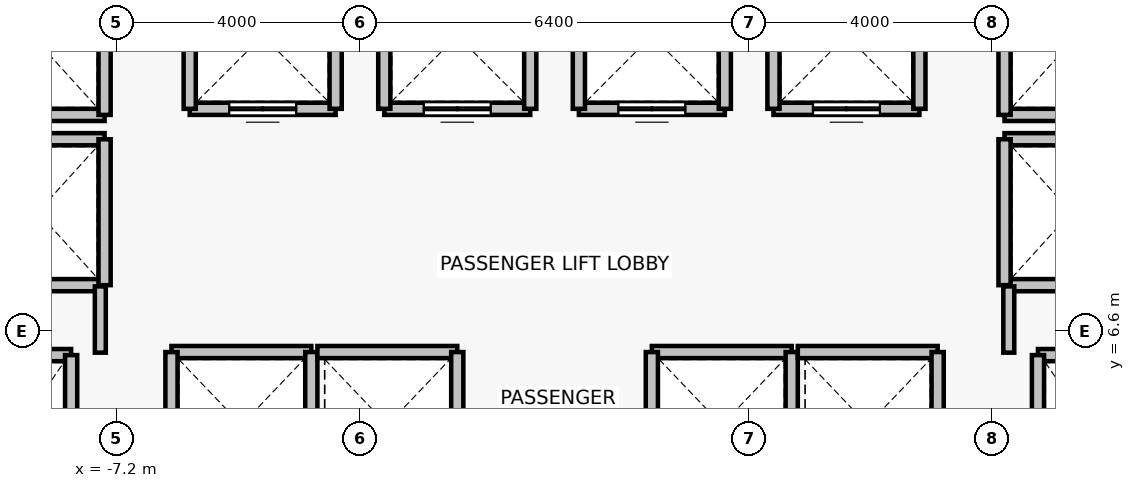
"""IFC4 building model, lengths in metres.
Left out: names, types, materials, properties, quantities, classifications, styles, units other than length and angle.
Written with IfcOpenShell. Run it as: python <this file> out.ifc"""

import sys

from ifc_helpers import new_model, si_unit, direction, frame, frame_2d, origin, place, context, subcontext, project, spatial, rectangle, extrude, source, transform, mapped, element, fill, save


model = new_model("IFC4")
c1 = context("Model", 3, precision=1e-05, world=origin(), true_north=direction((0.0, 1.0)))
c2 = subcontext(c1, "Body", "Model", "MODEL_VIEW")
j1 = project(units=[si_unit("LENGTHUNIT", "METRE"), si_unit("PLANEANGLEUNIT", "RADIAN")], contexts=[c1])
p1 = place(None, origin())
s1 = spatial("IfcSite", under=j1, at=p1, CompositionType="ELEMENT")
p2 = place(p1, origin())
s2 = spatial("IfcBuilding", under=s1, at=p2, CompositionType="ELEMENT")
p3 = place(p2, frame((0.0, 0.0, 43.9)))
s3 = spatial("IfcBuildingStorey", under=s2, at=p3, CompositionType="ELEMENT", Elevation=43.9)
p4 = place(p3, frame((-9.95, 6.2, 0.0), z_axis=(0.0, 0.0, 1.0), x_axis=(1.0, 0.0, 0.0)))
e1 = element("IfcWall", 1, at=p4, inside=s3, PredefinedType="SOLIDWALL", context=c2, shape_type="SweptSolid", body=[
    extrude(rectangle(XDim=2.0, YDim=0.2, at=frame_2d((1.0, 0.0))), origin(), (0.0, 0.0, 1.0), 3.075),
])
p5 = place(p3, frame((-7.95, 6.2, 0.0), z_axis=(0.0, 0.0, 1.0), x_axis=(0.0, -1.0, 0.0)))
e2 = element("IfcWall", 2, at=p5, inside=s3, PredefinedType="SOLIDWALL", context=c2, shape_type="SweptSolid", body=[
    extrude(rectangle(XDim=2.8, YDim=0.2, at=frame_2d((1.4, 0.0))), origin(), (0.0, 0.0, 1.0), 3.075),
])
p6 = place(p3, frame((7.95, 6.2, 0.0), z_axis=(0.0, 0.0, 1.0), x_axis=(1.0, 0.0, 0.0)))
e3 = element("IfcWall", 3, at=p6, inside=s3, PredefinedType="SOLIDWALL", context=c2, shape_type="SweptSolid", body=[
    extrude(rectangle(XDim=2.0, YDim=0.2, at=frame_2d((1.0, 0.0))), origin(), (0.0, 0.0, 1.0), 3.075),
])
p7 = place(p3, frame((7.95, 3.4, 0.0), z_axis=(0.0, 0.0, 1.0), x_axis=(0.0, 1.0, 0.0)))
e4 = element("IfcWall", 4, at=p7, inside=s3, PredefinedType="SOLIDWALL", context=c2, shape_type="SweptSolid", body=[
    extrude(rectangle(XDim=2.8, YDim=0.2, at=frame_2d((1.4, 0.0))), origin(), (0.0, 0.0, 1.0), 3.075),
])
p8 = place(p3, frame((-3.6, 10.25, 0.0), z_axis=(0.0, 0.0, 1.0), x_axis=(-1.0, 0.0, 0.0)))
e5 = element("IfcWall", 5, at=p8, inside=s3, PredefinedType="SOLIDWALL", context=c2, shape_type="SweptSolid", body=[
    extrude(rectangle(XDim=2.4, YDim=0.2, at=frame_2d((1.2, 0.0))), origin(), (0.0, 0.0, 1.0), 3.075),
])
p9 = place(p8, frame((0.65, 0.0, 0.0)))
e6 = element("IfcOpeningElement", 6, at=p9, cuts=e5, PredefinedType="OPENING", context=c2, shape_type="SweptSolid", body=[
    extrude(rectangle(XDim=1.1, YDim=2.2, at=frame_2d((0.55, 1.1))), frame((0.0, 0.11, 0.0), z_axis=(0.0, -1.0, 0.0), x_axis=(1.0, 0.0, 0.0)), (0.0, 0.0, 1.0), 0.22),
])
for number, where, z_axis, x_axis in (
    (7, (-6.0, 10.25, 0.0), (0.0, 0.0, 1.0), (0.0, 1.0, 0.0)),
    (8, (-3.6, 12.65, 0.0), (0.0, 0.0, 1.0), (0.0, -1.0, 0.0)),
):
    element("IfcWall", number, at=place(p3, frame(where, z_axis=z_axis, x_axis=x_axis)), inside=s3, PredefinedType="SOLIDWALL", context=c2, shape_type="SweptSolid", body=[
        extrude(rectangle(XDim=2.4, YDim=0.2, at=frame_2d((1.2, 0.0))), origin(), (0.0, 0.0, 1.0), 3.075),
    ])
p10 = place(p3, frame((-0.4, 10.25, 0.0), z_axis=(0.0, 0.0, 1.0), x_axis=(-1.0, 0.0, 0.0)))
e9 = element("IfcWall", 9, at=p10, inside=s3, PredefinedType="SOLIDWALL", context=c2, shape_type="SweptSolid", body=[
    extrude(rectangle(XDim=2.4, YDim=0.2, at=frame_2d((1.2, 0.0))), origin(), (0.0, 0.0, 1.0), 3.075),
])
p11 = place(p10, frame((0.65, 0.0, 0.0)))
e10 = element("IfcOpeningElement", 10, at=p11, cuts=e9, PredefinedType="OPENING", context=c2, shape_type="SweptSolid", body=[
    extrude(rectangle(XDim=1.1, YDim=2.2, at=frame_2d((0.55, 1.1))), frame((0.0, 0.11, 0.0), z_axis=(0.0, -1.0, 0.0), x_axis=(1.0, 0.0, 0.0)), (0.0, 0.0, 1.0), 0.22),
])
for number, where, z_axis, x_axis in (
    (11, (-2.8, 10.25, 0.0), (0.0, 0.0, 1.0), (0.0, 1.0, 0.0)),
    (12, (-0.4, 12.65, 0.0), (0.0, 0.0, 1.0), (0.0, -1.0, 0.0)),
):
    element("IfcWall", number, at=place(p3, frame(where, z_axis=z_axis, x_axis=x_axis)), inside=s3, PredefinedType="SOLIDWALL", context=c2, shape_type="SweptSolid", body=[
        extrude(rectangle(XDim=2.4, YDim=0.2, at=frame_2d((1.2, 0.0))), origin(), (0.0, 0.0, 1.0), 3.075),
    ])
p12 = place(p3, frame((2.8, 10.25, 0.0), z_axis=(0.0, 0.0, 1.0), x_axis=(-1.0, 0.0, 0.0)))
e13 = element("IfcWall", 13, at=p12, inside=s3, PredefinedType="SOLIDWALL", context=c2, shape_type="SweptSolid", body=[
    extrude(rectangle(XDim=2.4, YDim=0.2, at=frame_2d((1.2, 0.0))), origin(), (0.0, 0.0, 1.0), 3.075),
])
p13 = place(p12, frame((0.65, 0.0, 0.0)))
e14 = element("IfcOpeningElement", 14, at=p13, cuts=e13, PredefinedType="OPENING", context=c2, shape_type="SweptSolid", body=[
    extrude(rectangle(XDim=1.1, YDim=2.2, at=frame_2d((0.55, 1.1))), frame((0.0, 0.11, 0.0), z_axis=(0.0, -1.0, 0.0), x_axis=(1.0, 0.0, 0.0)), (0.0, 0.0, 1.0), 0.22),
])
for number, where, z_axis, x_axis in (
    (15, (0.4, 10.25, 0.0), (0.0, 0.0, 1.0), (0.0, 1.0, 0.0)),
    (16, (2.8, 12.65, 0.0), (0.0, 0.0, 1.0), (0.0, -1.0, 0.0)),
):
    element("IfcWall", number, at=place(p3, frame(where, z_axis=z_axis, x_axis=x_axis)), inside=s3, PredefinedType="SOLIDWALL", context=c2, shape_type="SweptSolid", body=[
        extrude(rectangle(XDim=2.4, YDim=0.2, at=frame_2d((1.2, 0.0))), origin(), (0.0, 0.0, 1.0), 3.075),
    ])
p14 = place(p3, frame((6.0, 10.25, 0.0), z_axis=(0.0, 0.0, 1.0), x_axis=(-1.0, 0.0, 0.0)))
e17 = element("IfcWall", 17, at=p14, inside=s3, PredefinedType="SOLIDWALL", context=c2, shape_type="SweptSolid", body=[
    extrude(rectangle(XDim=2.4, YDim=0.2, at=frame_2d((1.2, 0.0))), origin(), (0.0, 0.0, 1.0), 3.075),
])
p15 = place(p14, frame((0.65, 0.0, 0.0)))
e18 = element("IfcOpeningElement", 18, at=p15, cuts=e17, PredefinedType="OPENING", context=c2, shape_type="SweptSolid", body=[
    extrude(rectangle(XDim=1.1, YDim=2.2, at=frame_2d((0.55, 1.1))), frame((0.0, 0.11, 0.0), z_axis=(0.0, -1.0, 0.0), x_axis=(1.0, 0.0, 0.0)), (0.0, 0.0, 1.0), 0.22),
])
for number, where, z_axis, x_axis in (
    (19, (3.6, 10.25, 0.0), (0.0, 0.0, 1.0), (0.0, 1.0, 0.0)),
    (20, (6.0, 12.65, 0.0), (0.0, 0.0, 1.0), (0.0, -1.0, 0.0)),
):
    element("IfcWall", number, at=place(p3, frame(where, z_axis=z_axis, x_axis=x_axis)), inside=s3, PredefinedType="SOLIDWALL", context=c2, shape_type="SweptSolid", body=[
        extrude(rectangle(XDim=2.4, YDim=0.2, at=frame_2d((1.2, 0.0))), origin(), (0.0, 0.0, 1.0), 3.075),
    ])
p16 = place(p3, frame((-6.3, 6.25, 0.0), z_axis=(0.0, 0.0, 1.0), x_axis=(1.0, 0.0, 0.0)))
e21 = element("IfcWall", 21, at=p16, inside=s3, PredefinedType="SOLIDWALL", context=c2, shape_type="SweptSolid", body=[
    extrude(rectangle(XDim=2.3, YDim=0.2, at=frame_2d((1.15, 0.0))), origin(), (0.0, 0.0, 1.0), 3.075),
])
for number, where, z_axis, x_axis in (
    (22, (-6.3, 3.85, 0.0), (0.0, 0.0, 1.0), (0.0, 1.0, 0.0)),
    (23, (-4.0, 6.25, 0.0), (0.0, 0.0, 1.0), (0.0, -1.0, 0.0)),
):
    element("IfcWall", number, at=place(p3, frame(where, z_axis=z_axis, x_axis=x_axis)), inside=s3, PredefinedType="SOLIDWALL", context=c2, shape_type="SweptSolid", body=[
        extrude(rectangle(XDim=2.4, YDim=0.2, at=frame_2d((1.2, 0.0))), origin(), (0.0, 0.0, 1.0), 3.075),
    ])
p17 = place(p3, frame((-3.9, 6.25, 0.0), z_axis=(0.0, 0.0, 1.0), x_axis=(1.0, 0.0, 0.0)))
e24 = element("IfcWall", 24, at=p17, inside=s3, PredefinedType="SOLIDWALL", context=c2, shape_type="SweptSolid", body=[
    extrude(rectangle(XDim=2.3, YDim=0.2, at=frame_2d((1.15, 0.0))), origin(), (0.0, 0.0, 1.0), 3.075),
])
p18 = place(p3, frame((-1.6, 6.25, 0.0), z_axis=(0.0, 0.0, 1.0), x_axis=(0.0, -1.0, 0.0)))
e25 = element("IfcWall", 25, at=p18, inside=s3, PredefinedType="SOLIDWALL", context=c2, shape_type="SweptSolid", body=[
    extrude(rectangle(XDim=2.4, YDim=0.2, at=frame_2d((1.2, 0.0))), origin(), (0.0, 0.0, 1.0), 3.075),
])
p19 = place(p3, frame((1.6, 6.25, 0.0), z_axis=(0.0, 0.0, 1.0), x_axis=(1.0, 0.0, 0.0)))
e26 = element("IfcWall", 26, at=p19, inside=s3, PredefinedType="SOLIDWALL", context=c2, shape_type="SweptSolid", body=[
    extrude(rectangle(XDim=2.3, YDim=0.2, at=frame_2d((1.15, 0.0))), origin(), (0.0, 0.0, 1.0), 3.075),
])
for number, where, z_axis, x_axis in (
    (27, (1.6, 3.85, 0.0), (0.0, 0.0, 1.0), (0.0, 1.0, 0.0)),
    (28, (3.9, 6.25, 0.0), (0.0, 0.0, 1.0), (0.0, -1.0, 0.0)),
):
    element("IfcWall", number, at=place(p3, frame(where, z_axis=z_axis, x_axis=x_axis)), inside=s3, PredefinedType="SOLIDWALL", context=c2, shape_type="SweptSolid", body=[
        extrude(rectangle(XDim=2.4, YDim=0.2, at=frame_2d((1.2, 0.0))), origin(), (0.0, 0.0, 1.0), 3.075),
    ])
p20 = place(p3, frame((4.0, 6.25, 0.0), z_axis=(0.0, 0.0, 1.0), x_axis=(1.0, 0.0, 0.0)))
e29 = element("IfcWall", 29, at=p20, inside=s3, PredefinedType="SOLIDWALL", context=c2, shape_type="SweptSolid", body=[
    extrude(rectangle(XDim=2.3, YDim=0.2, at=frame_2d((1.15, 0.0))), origin(), (0.0, 0.0, 1.0), 3.075),
])
p21 = place(p3, frame((6.3, 6.25, 0.0), z_axis=(0.0, 0.0, 1.0), x_axis=(0.0, -1.0, 0.0)))
e30 = element("IfcWall", 30, at=p21, inside=s3, PredefinedType="SOLIDWALL", context=c2, shape_type="SweptSolid", body=[
    extrude(rectangle(XDim=2.4, YDim=0.2, at=frame_2d((1.2, 0.0))), origin(), (0.0, 0.0, 1.0), 3.075),
])
for number, where, z_axis, x_axis in (
    (31, (-7.4, 7.35, 0.0), (0.0, 0.0, 1.0), (-1.0, 0.0, 0.0)),
    (32, (-9.6, 9.75, 0.0), (0.0, 0.0, 1.0), (1.0, 0.0, 0.0)),
):
    element("IfcWall", number, at=place(p3, frame(where, z_axis=z_axis, x_axis=x_axis)), inside=s3, PredefinedType="SOLIDWALL", context=c2, shape_type="SweptSolid", body=[
        extrude(rectangle(XDim=2.2, YDim=0.2, at=frame_2d((1.1, 0.0))), origin(), (0.0, 0.0, 1.0), 2.465),
    ])
p22 = place(p3, frame((-7.4, 9.75, 0.0), z_axis=(0.0, 0.0, 1.0), x_axis=(0.0, -1.0, 0.0)))
e33 = element("IfcWall", 33, at=p22, inside=s3, PredefinedType="SOLIDWALL", context=c2, shape_type="SweptSolid", body=[
    extrude(rectangle(XDim=2.4, YDim=0.2, at=frame_2d((1.2, 0.0))), origin(), (0.0, 0.0, 1.0), 2.465),
])
p23 = place(p3, frame((-7.4, 10.15, 0.0), z_axis=(0.0, 0.0, 1.0), x_axis=(-1.0, 0.0, 0.0)))
e34 = element("IfcWall", 34, at=p23, inside=s3, PredefinedType="SOLIDWALL", context=c2, shape_type="SweptSolid", body=[
    extrude(rectangle(XDim=2.2, YDim=0.2, at=frame_2d((1.1, 0.0))), origin(), (0.0, 0.0, 1.0), 2.465),
])
p24 = place(p3, frame((-7.4, 12.55, 0.0), z_axis=(0.0, 0.0, 1.0), x_axis=(0.0, -1.0, 0.0)))
e35 = element("IfcWall", 35, at=p24, inside=s3, PredefinedType="SOLIDWALL", context=c2, shape_type="SweptSolid", body=[
    extrude(rectangle(XDim=2.4, YDim=0.2, at=frame_2d((1.2, 0.0))), origin(), (0.0, 0.0, 1.0), 2.465),
])
for number, where, z_axis, x_axis in (
    (36, (9.6, 7.35, 0.0), (0.0, 0.0, 1.0), (-1.0, 0.0, 0.0)),
    (37, (7.4, 9.75, 0.0), (0.0, 0.0, 1.0), (1.0, 0.0, 0.0)),
):
    element("IfcWall", number, at=place(p3, frame(where, z_axis=z_axis, x_axis=x_axis)), inside=s3, PredefinedType="SOLIDWALL", context=c2, shape_type="SweptSolid", body=[
        extrude(rectangle(XDim=2.2, YDim=0.2, at=frame_2d((1.1, 0.0))), origin(), (0.0, 0.0, 1.0), 2.465),
    ])
p25 = place(p3, frame((7.4, 7.35, 0.0), z_axis=(0.0, 0.0, 1.0), x_axis=(0.0, 1.0, 0.0)))
e38 = element("IfcWall", 38, at=p25, inside=s3, PredefinedType="SOLIDWALL", context=c2, shape_type="SweptSolid", body=[
    extrude(rectangle(XDim=2.4, YDim=0.2, at=frame_2d((1.2, 0.0))), origin(), (0.0, 0.0, 1.0), 2.465),
])
p26 = place(p3, frame((9.6, 10.15, 0.0), z_axis=(0.0, 0.0, 1.0), x_axis=(-1.0, 0.0, 0.0)))
e39 = element("IfcWall", 39, at=p26, inside=s3, PredefinedType="SOLIDWALL", context=c2, shape_type="SweptSolid", body=[
    extrude(rectangle(XDim=2.2, YDim=0.2, at=frame_2d((1.1, 0.0))), origin(), (0.0, 0.0, 1.0), 2.465),
])
p27 = place(p3, frame((7.4, 10.15, 0.0), z_axis=(0.0, 0.0, 1.0), x_axis=(0.0, 1.0, 0.0)))
e40 = element("IfcWall", 40, at=p27, inside=s3, PredefinedType="SOLIDWALL", context=c2, shape_type="SweptSolid", body=[
    extrude(rectangle(XDim=2.4, YDim=0.2, at=frame_2d((1.2, 0.0))), origin(), (0.0, 0.0, 1.0), 2.465),
])
for number, where, z_axis, x_axis in (
    (41, (-7.47, 7.33, 0.0), (0.0, 0.0, 1.0), (0.0, -1.0, 0.0)),
    (42, (7.47, 6.24, 0.0), (0.0, 0.0, 1.0), (0.0, 1.0, 0.0)),
):
    element("IfcWall", number, at=place(p3, frame(where, z_axis=z_axis, x_axis=x_axis)), inside=s3, PredefinedType="PARTITIONING", context=c2, shape_type="SweptSolid", body=[
        extrude(rectangle(XDim=1.09, YDim=0.18, at=frame_2d((0.545, 0.0))), origin(), (0.0, 0.0, 1.0), 2.465),
    ])
m1 = source(origin(), c2, "Body", "SweptSolid", [
    extrude(rectangle(XDim=1.1, YDim=2.2, at=frame_2d((0.55, 1.1))), frame((0.0, 0.025, 0.0), z_axis=(0.0, -1.0, 0.0), x_axis=(1.0, 0.0, 0.0)), (0.0, 0.0, 1.0), 0.05),
])
p28 = place(p9, origin())
e43 = element("IfcDoor", 43, at=p28, inside=s3, OperationType="DOUBLE_DOOR_SLIDING", PredefinedType="DOOR", context=c2, shape_type="MappedRepresentation", body=[
    mapped(m1, transform((0.0, 0.0, 0.0), x_axis=(1.0, 0.0, 0.0), y_axis=(0.0, 1.0, 0.0), z_axis=(0.0, 0.0, 1.0), scale=1.0)),
])
fill(e6, e43)
p29 = place(p11, origin())
e44 = element("IfcDoor", 44, at=p29, inside=s3, OperationType="DOUBLE_DOOR_SLIDING", PredefinedType="DOOR", context=c2, shape_type="MappedRepresentation", body=[
    mapped(m1, transform((0.0, 0.0, 0.0), x_axis=(1.0, 0.0, 0.0), y_axis=(0.0, 1.0, 0.0), z_axis=(0.0, 0.0, 1.0), scale=1.0)),
])
fill(e10, e44)
p30 = place(p13, origin())
e45 = element("IfcDoor", 45, at=p30, inside=s3, OperationType="DOUBLE_DOOR_SLIDING", PredefinedType="DOOR", context=c2, shape_type="MappedRepresentation", body=[
    mapped(m1, transform((0.0, 0.0, 0.0), x_axis=(1.0, 0.0, 0.0), y_axis=(0.0, 1.0, 0.0), z_axis=(0.0, 0.0, 1.0), scale=1.0)),
])
fill(e14, e45)
p31 = place(p15, origin())
e46 = element("IfcDoor", 46, at=p31, inside=s3, OperationType="DOUBLE_DOOR_SLIDING", PredefinedType="DOOR", context=c2, shape_type="MappedRepresentation", body=[
    mapped(m1, transform((0.0, 0.0, 0.0), x_axis=(1.0, 0.0, 0.0), y_axis=(0.0, 1.0, 0.0), z_axis=(0.0, 0.0, 1.0), scale=1.0)),
])
fill(e18, e46)
save(model, sys.argv[1])
